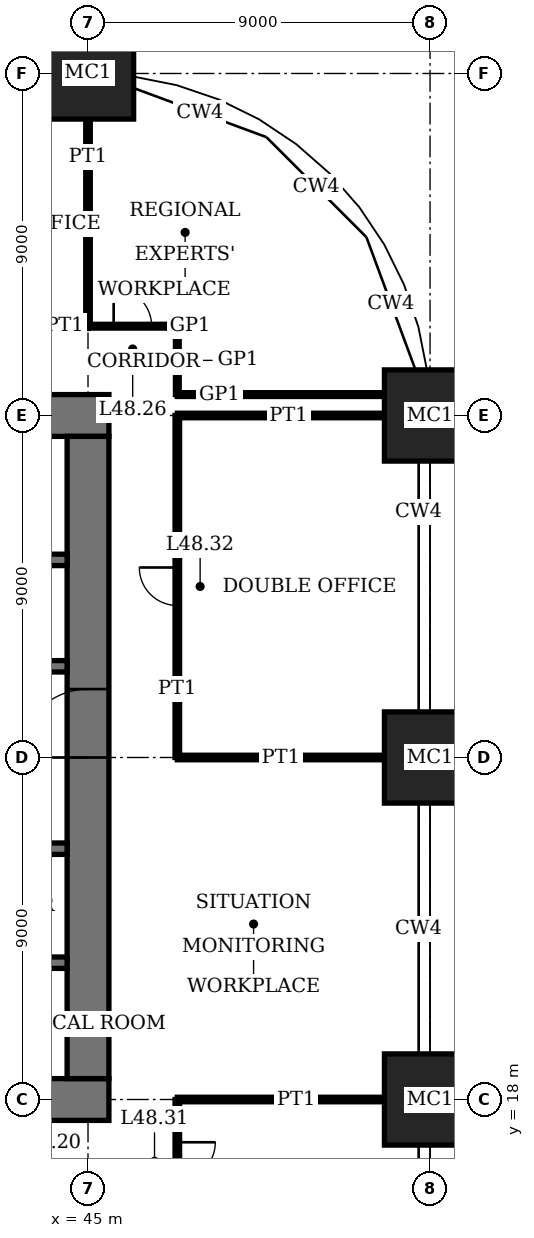
"""IFC4 building model, lengths in metres.
Left out: names, types, materials, properties, quantities, classifications, styles, units other than length and angle.
Written with IfcOpenShell. Run it as: python <this file> out.ifc"""

import sys

from ifc_helpers import new_model, si_unit, direction, frame, frame_2d, origin, origin_2d, place, context, subcontext, project, spatial, rectangle, extrude, element, fill, save


model = new_model("IFC4")
c1 = context("Model", 3, precision=1e-05, world=origin(), true_north=direction((0.0, 1.0)))
c2 = subcontext(c1, "Body", "Model", "MODEL_VIEW")
j1 = project(units=[si_unit("LENGTHUNIT", "METRE"), si_unit("PLANEANGLEUNIT", "RADIAN")], contexts=[c1])
p1 = place(None, origin())
s1 = spatial("IfcSite", under=j1, at=p1, CompositionType="ELEMENT")
p2 = place(p1, origin())
s2 = spatial("IfcBuilding", under=s1, at=p2, CompositionType="ELEMENT")
p3 = place(p2, frame((0.0, 0.0, 198.2)))
s3 = spatial("IfcBuildingStorey", under=s2, at=p3, CompositionType="ELEMENT", Elevation=198.2)
for number, where, z_axis, x_axis in (
    (1, (45.0, 45.0, 0.0), (0.0, 0.0, 1.0), (1.0, 0.0, 0.0)),
    (2, (54.0, 18.0, 0.0), (0.0, 0.0, 1.0), (1.0, 0.0, 0.0)),
    (3, (54.0, 27.0, 0.0), (0.0, 0.0, 1.0), (1.0, 0.0, 0.0)),
    (4, (54.0, 36.0, 0.0), (0.0, 0.0, 1.0), (1.0, 0.0, 0.0)),
):
    element("IfcColumn", number, at=place(p3, frame(where, z_axis=z_axis, x_axis=x_axis)), inside=s3, PredefinedType="COLUMN", context=c2, shape_type="SweptSolid", body=[
        extrude(rectangle(XDim=2.4, YDim=2.4, at=origin_2d()), origin(), (0.0, 0.0, 1.0), 4.0),
    ])
p4 = place(p3, frame((17.45, 18.0, 0.0), z_axis=(0.0, 0.0, 1.0), x_axis=(1.0, 0.0, 0.0)))
e5 = element("IfcWall", 5, at=p4, inside=s3, PredefinedType="SHEAR", context=c2, shape_type="SweptSolid", body=[
    extrude(rectangle(XDim=28.1, YDim=1.1, at=frame_2d((14.05, 0.0))), origin(), (0.0, 0.0, 1.0), 4.0),
])
p5 = place(p4, frame((11.55, 0.0, 0.0)))
e6 = element("IfcOpeningElement", 6, at=p5, cuts=e5, PredefinedType="OPENING", context=c2, shape_type="SweptSolid", body=[
    extrude(rectangle(XDim=1.0, YDim=2.4, at=frame_2d((0.5, 1.2))), frame((0.0, 0.56, 0.0), z_axis=(0.0, -1.0, 0.0), x_axis=(1.0, 0.0, 0.0)), (0.0, 0.0, 1.0), 1.12),
])
p6 = place(p4, frame((16.55, 0.0, 0.0)))
e7 = element("IfcOpeningElement", 7, at=p6, cuts=e5, PredefinedType="OPENING", context=c2, shape_type="SweptSolid", body=[
    extrude(rectangle(XDim=1.0, YDim=2.4, at=frame_2d((0.5, 1.2))), frame((0.0, 0.56, 0.0), z_axis=(0.0, -1.0, 0.0), x_axis=(1.0, 0.0, 0.0)), (0.0, 0.0, 1.0), 1.12),
])
p7 = place(p4, frame((20.0, 0.0, 0.0)))
e8 = element("IfcOpeningElement", 8, at=p7, cuts=e5, PredefinedType="OPENING", context=c2, shape_type="SweptSolid", body=[
    extrude(rectangle(XDim=1.1, YDim=2.4, at=frame_2d((0.55, 1.2))), frame((0.0, 0.56, 0.0), z_axis=(0.0, -1.0, 0.0), x_axis=(1.0, 0.0, 0.0)), (0.0, 0.0, 1.0), 1.12),
])
p8 = place(p4, frame((24.05, 0.0, 0.0)))
e9 = element("IfcOpeningElement", 9, at=p8, cuts=e5, PredefinedType="OPENING", context=c2, shape_type="SweptSolid", body=[
    extrude(rectangle(XDim=1.0, YDim=2.4, at=frame_2d((0.5, 1.2))), frame((0.0, 0.56, 0.0), z_axis=(0.0, -1.0, 0.0), x_axis=(1.0, 0.0, 0.0)), (0.0, 0.0, 1.0), 1.12),
])
p9 = place(p3, frame((45.55, 36.0, 0.0), z_axis=(0.0, 0.0, 1.0), x_axis=(-1.0, 0.0, 0.0)))
e10 = element("IfcWall", 10, at=p9, inside=s3, PredefinedType="SHEAR", context=c2, shape_type="SweptSolid", body=[
    extrude(rectangle(XDim=28.1, YDim=1.1, at=frame_2d((14.05, 0.0))), origin(), (0.0, 0.0, 1.0), 4.0),
])
p10 = place(p9, frame((11.55, 0.0, 0.0)))
e11 = element("IfcOpeningElement", 11, at=p10, cuts=e10, PredefinedType="OPENING", context=c2, shape_type="SweptSolid", body=[
    extrude(rectangle(XDim=1.0, YDim=2.4, at=frame_2d((0.5, 1.2))), frame((0.0, 0.56, 0.0), z_axis=(0.0, -1.0, 0.0), x_axis=(1.0, 0.0, 0.0)), (0.0, 0.0, 1.0), 1.12),
])
p11 = place(p9, frame((16.55, 0.0, 0.0)))
e12 = element("IfcOpeningElement", 12, at=p11, cuts=e10, PredefinedType="OPENING", context=c2, shape_type="SweptSolid", body=[
    extrude(rectangle(XDim=1.0, YDim=2.4, at=frame_2d((0.5, 1.2))), frame((0.0, 0.56, 0.0), z_axis=(0.0, -1.0, 0.0), x_axis=(1.0, 0.0, 0.0)), (0.0, 0.0, 1.0), 1.12),
])
p12 = place(p9, frame((20.0, 0.0, 0.0)))
e13 = element("IfcOpeningElement", 13, at=p12, cuts=e10, PredefinedType="OPENING", context=c2, shape_type="SweptSolid", body=[
    extrude(rectangle(XDim=1.1, YDim=2.4, at=frame_2d((0.55, 1.2))), frame((0.0, 0.56, 0.0), z_axis=(0.0, -1.0, 0.0), x_axis=(1.0, 0.0, 0.0)), (0.0, 0.0, 1.0), 1.12),
])
p13 = place(p9, frame((24.05, 0.0, 0.0)))
e14 = element("IfcOpeningElement", 14, at=p13, cuts=e10, PredefinedType="OPENING", context=c2, shape_type="SweptSolid", body=[
    extrude(rectangle(XDim=1.0, YDim=2.4, at=frame_2d((0.5, 1.2))), frame((0.0, 0.56, 0.0), z_axis=(0.0, -1.0, 0.0), x_axis=(1.0, 0.0, 0.0)), (0.0, 0.0, 1.0), 1.12),
])
p14 = place(p3, frame((45.0, 18.55, 0.0), z_axis=(0.0, 0.0, 1.0), x_axis=(0.0, 1.0, 0.0)))
e15 = element("IfcWall", 15, at=p14, inside=s3, PredefinedType="SHEAR", context=c2, shape_type="SweptSolid", body=[
    extrude(rectangle(XDim=16.9, YDim=1.1, at=frame_2d((8.45, 0.0))), origin(), (0.0, 0.0, 1.0), 4.0),
])
p15 = place(p14, frame((8.45, 0.0, 0.0)))
e16 = element("IfcOpeningElement", 16, at=p15, cuts=e15, PredefinedType="OPENING", context=c2, shape_type="SweptSolid", body=[
    extrude(rectangle(XDim=1.8, YDim=2.4, at=frame_2d((0.9, 1.2))), frame((0.0, 0.56, 0.0), z_axis=(0.0, -1.0, 0.0), x_axis=(1.0, 0.0, 0.0)), (0.0, 0.0, 1.0), 1.12),
])
p16 = place(p3, frame((36.15, 32.2, 0.0), z_axis=(0.0, 0.0, 1.0), x_axis=(1.0, 0.0, 0.0)))
e17 = element("IfcWall", 17, at=p16, inside=s3, PredefinedType="SHEAR", context=c2, shape_type="SweptSolid", body=[
    extrude(rectangle(XDim=8.3, YDim=0.3, at=frame_2d((4.15, 0.0))), origin(), (0.0, 0.0, 1.0), 4.0),
])
p17 = place(p16, frame((0.45, 0.0, 0.0)))
e18 = element("IfcOpeningElement", 18, at=p17, cuts=e17, PredefinedType="OPENING", context=c2, shape_type="SweptSolid", body=[
    extrude(rectangle(XDim=1.0, YDim=2.4, at=frame_2d((0.5, 1.2))), frame((0.0, 0.16, 0.0), z_axis=(0.0, -1.0, 0.0), x_axis=(1.0, 0.0, 0.0)), (0.0, 0.0, 1.0), 0.32),
])
p18 = place(p3, frame((18.55, 24.6, 0.0), z_axis=(0.0, 0.0, 1.0), x_axis=(1.0, 0.0, 0.0)))
e19 = element("IfcWall", 19, at=p18, inside=s3, PredefinedType="SHEAR", context=c2, shape_type="SweptSolid", body=[
    extrude(rectangle(XDim=25.9, YDim=0.3, at=frame_2d((12.95, 0.0))), origin(), (0.0, 0.0, 1.0), 4.0),
])
p19 = place(p18, frame((4.95, 0.0, 0.0)))
e20 = element("IfcOpeningElement", 20, at=p19, cuts=e19, PredefinedType="OPENING", context=c2, shape_type="SweptSolid", body=[
    extrude(rectangle(XDim=1.0, YDim=2.4, at=frame_2d((0.5, 1.2))), frame((0.0, 0.16, 0.0), z_axis=(0.0, -1.0, 0.0), x_axis=(1.0, 0.0, 0.0)), (0.0, 0.0, 1.0), 0.32),
])
p20 = place(p18, frame((24.5, 0.0, 0.0)))
e21 = element("IfcOpeningElement", 21, at=p20, cuts=e19, PredefinedType="OPENING", context=c2, shape_type="SweptSolid", body=[
    extrude(rectangle(XDim=0.9, YDim=2.1, at=frame_2d((0.45, 1.05))), frame((0.0, 0.16, 0.0), z_axis=(0.0, -1.0, 0.0), x_axis=(1.0, 0.0, 0.0)), (0.0, 0.0, 1.0), 0.32),
])
p21 = place(p18, frame((21.3, 0.0, 0.0)))
e22 = element("IfcOpeningElement", 22, at=p21, cuts=e19, PredefinedType="OPENING", context=c2, shape_type="SweptSolid", body=[
    extrude(rectangle(XDim=1.3, YDim=2.4, at=frame_2d((0.65, 1.2))), frame((0.0, 0.16, 0.0), z_axis=(0.0, -1.0, 0.0), x_axis=(1.0, 0.0, 0.0)), (0.0, 0.0, 1.0), 0.32),
])
p22 = place(p3, frame((18.55, 29.4, 0.0), z_axis=(0.0, 0.0, 1.0), x_axis=(1.0, 0.0, 0.0)))
e23 = element("IfcWall", 23, at=p22, inside=s3, PredefinedType="SHEAR", context=c2, shape_type="SweptSolid", body=[
    extrude(rectangle(XDim=25.9, YDim=0.3, at=frame_2d((12.95, 0.0))), origin(), (0.0, 0.0, 1.0), 4.0),
])
p23 = place(p22, frame((19.95, 0.0, 0.0)))
e24 = element("IfcOpeningElement", 24, at=p23, cuts=e23, PredefinedType="OPENING", context=c2, shape_type="SweptSolid", body=[
    extrude(rectangle(XDim=1.0, YDim=2.4, at=frame_2d((0.5, 1.2))), frame((0.0, 0.16, 0.0), z_axis=(0.0, -1.0, 0.0), x_axis=(1.0, 0.0, 0.0)), (0.0, 0.0, 1.0), 0.32),
])
p24 = place(p22, frame((0.5, 0.0, 0.0)))
e25 = element("IfcOpeningElement", 25, at=p24, cuts=e23, PredefinedType="OPENING", context=c2, shape_type="SweptSolid", body=[
    extrude(rectangle(XDim=0.9, YDim=2.1, at=frame_2d((0.45, 1.05))), frame((0.0, 0.16, 0.0), z_axis=(0.0, -1.0, 0.0), x_axis=(1.0, 0.0, 0.0)), (0.0, 0.0, 1.0), 0.32),
])
p25 = place(p22, frame((15.45, 0.0, 0.0)))
e26 = element("IfcOpeningElement", 26, at=p25, cuts=e23, PredefinedType="OPENING", context=c2, shape_type="SweptSolid", body=[
    extrude(rectangle(XDim=1.0, YDim=2.4, at=frame_2d((0.5, 1.2))), frame((0.0, 0.16, 0.0), z_axis=(0.0, -1.0, 0.0), x_axis=(1.0, 0.0, 0.0)), (0.0, 0.0, 1.0), 0.32),
])
p26 = place(p22, frame((12.45, 0.0, 0.0)))
e27 = element("IfcOpeningElement", 27, at=p26, cuts=e23, PredefinedType="OPENING", context=c2, shape_type="SweptSolid", body=[
    extrude(rectangle(XDim=1.0, YDim=2.4, at=frame_2d((0.5, 1.2))), frame((0.0, 0.16, 0.0), z_axis=(0.0, -1.0, 0.0), x_axis=(1.0, 0.0, 0.0)), (0.0, 0.0, 1.0), 0.32),
])
p27 = place(p22, frame((9.4, 0.0, 0.0)))
e28 = element("IfcOpeningElement", 28, at=p27, cuts=e23, PredefinedType="OPENING", context=c2, shape_type="SweptSolid", body=[
    extrude(rectangle(XDim=1.1, YDim=2.4, at=frame_2d((0.55, 1.2))), frame((0.0, 0.16, 0.0), z_axis=(0.0, -1.0, 0.0), x_axis=(1.0, 0.0, 0.0)), (0.0, 0.0, 1.0), 0.32),
])
p28 = place(p22, frame((6.4, 0.0, 0.0)))
e29 = element("IfcOpeningElement", 29, at=p28, cuts=e23, PredefinedType="OPENING", context=c2, shape_type="SweptSolid", body=[
    extrude(rectangle(XDim=1.1, YDim=2.4, at=frame_2d((0.55, 1.2))), frame((0.0, 0.16, 0.0), z_axis=(0.0, -1.0, 0.0), x_axis=(1.0, 0.0, 0.0)), (0.0, 0.0, 1.0), 0.32),
])
p29 = place(p22, frame((3.3, 0.0, 0.0)))
e30 = element("IfcOpeningElement", 30, at=p29, cuts=e23, PredefinedType="OPENING", context=c2, shape_type="SweptSolid", body=[
    extrude(rectangle(XDim=1.3, YDim=2.4, at=frame_2d((0.65, 1.2))), frame((0.0, 0.16, 0.0), z_axis=(0.0, -1.0, 0.0), x_axis=(1.0, 0.0, 0.0)), (0.0, 0.0, 1.0), 0.32),
])
p30 = place(p3, frame((27.15, 21.6, 0.0), z_axis=(0.0, 0.0, 1.0), x_axis=(1.0, 0.0, 0.0)))
e31 = element("IfcWall", 31, at=p30, inside=s3, PredefinedType="SHEAR", context=c2, shape_type="SweptSolid", body=[
    extrude(rectangle(XDim=17.3, YDim=0.3, at=frame_2d((8.65, 0.0))), origin(), (0.0, 0.0, 1.0), 4.0),
])
for number, where, z_axis, x_axis in (
    (32, (47.35, 18.0, 0.0), (0.0, 0.0, 1.0), (1.0, 0.0, 0.0)),
    (33, (47.35, 27.0, 0.0), (0.0, 0.0, 1.0), (1.0, 0.0, 0.0)),
    (34, (47.35, 36.0, 0.0), (0.0, 0.0, 1.0), (1.0, 0.0, 0.0)),
):
    element("IfcWall", number, at=place(p3, frame(where, z_axis=z_axis, x_axis=x_axis)), inside=s3, PredefinedType="PARTITIONING", context=c2, shape_type="SweptSolid", body=[
        extrude(rectangle(XDim=5.45, YDim=0.12, at=frame_2d((2.725, 0.0))), origin(), (0.0, 0.0, 1.0), 3.05),
    ])
p31 = place(p3, frame((47.35, 36.55, 0.0), z_axis=(0.0, 0.0, 1.0), x_axis=(1.0, 0.0, 0.0)))
e35 = element("IfcWall", 35, at=p31, inside=s3, PredefinedType="PARTITIONING", context=c2, shape_type="SweptSolid", body=[
    extrude(rectangle(XDim=5.45, YDim=0.1, at=frame_2d((2.725, 0.0))), origin(), (0.0, 0.0, 1.0), 3.75),
])
p32 = place(p3, frame((40.5, 38.35, 0.0), z_axis=(0.0, 0.0, 1.0), x_axis=(1.0, 0.0, 0.0)))
e36 = element("IfcWall", 36, at=p32, inside=s3, PredefinedType="PARTITIONING", context=c2, shape_type="SweptSolid", body=[
    extrude(rectangle(XDim=4.5, YDim=0.12, at=frame_2d((2.25, 0.0))), origin(), (0.0, 0.0, 1.0), 3.75),
])
p33 = place(p32, frame((1.75, 0.0, 0.0)))
e37 = element("IfcOpeningElement", 37, at=p33, cuts=e36, PredefinedType="OPENING", context=c2, shape_type="SweptSolid", body=[
    extrude(rectangle(XDim=1.0, YDim=2.4, at=frame_2d((0.5, 1.2))), frame((0.0, 0.07, 0.0), z_axis=(0.0, -1.0, 0.0), x_axis=(1.0, 0.0, 0.0)), (0.0, 0.0, 1.0), 0.14),
])
p34 = place(p3, frame((45.0, 38.35, 0.0), z_axis=(0.0, 0.0, 1.0), x_axis=(1.0, 0.0, 0.0)))
e38 = element("IfcWall", 38, at=p34, inside=s3, PredefinedType="PARTITIONING", context=c2, shape_type="SweptSolid", body=[
    extrude(rectangle(XDim=2.35, YDim=0.1, at=frame_2d((1.175, 0.0))), origin(), (0.0, 0.0, 1.0), 3.75),
])
p35 = place(p34, frame((0.675, 0.0, 0.0)))
e39 = element("IfcOpeningElement", 39, at=p35, cuts=e38, PredefinedType="OPENING", context=c2, shape_type="SweptSolid", body=[
    extrude(rectangle(XDim=1.0, YDim=2.4, at=frame_2d((0.5, 1.2))), frame((0.0, 0.06, 0.0), z_axis=(0.0, -1.0, 0.0), x_axis=(1.0, 0.0, 0.0)), (0.0, 0.0, 1.0), 0.12),
])
p36 = place(p3, frame((45.0, 38.35, 0.0), z_axis=(0.0, 0.0, 1.0), x_axis=(0.0, 1.0, 0.0)))
e40 = element("IfcWall", 40, at=p36, inside=s3, PredefinedType="PARTITIONING", context=c2, shape_type="SweptSolid", body=[
    extrude(rectangle(XDim=5.45, YDim=0.12, at=frame_2d((2.725, 0.0))), origin(), (0.0, 0.0, 1.0), 3.05),
])
p37 = place(p3, frame((47.35, 13.25, 0.0), z_axis=(0.0, 0.0, 1.0), x_axis=(0.0, 1.0, 0.0)))
e41 = element("IfcWall", 41, at=p37, inside=s3, PredefinedType="PARTITIONING", context=c2, shape_type="SweptSolid", body=[
    extrude(rectangle(XDim=4.75, YDim=0.12, at=frame_2d((2.375, 0.0))), origin(), (0.0, 0.0, 1.0), 3.75),
])
p38 = place(p37, frame((2.625, 0.0, 0.0)))
e42 = element("IfcOpeningElement", 42, at=p38, cuts=e41, PredefinedType="OPENING", context=c2, shape_type="SweptSolid", body=[
    extrude(rectangle(XDim=1.0, YDim=2.4, at=frame_2d((0.5, 1.2))), frame((0.0, 0.07, 0.0), z_axis=(0.0, -1.0, 0.0), x_axis=(1.0, 0.0, 0.0)), (0.0, 0.0, 1.0), 0.14),
])
p39 = place(p3, frame((47.35, 27.0, 0.0), z_axis=(0.0, 0.0, 1.0), x_axis=(0.0, 1.0, 0.0)))
e43 = element("IfcWall", 43, at=p39, inside=s3, PredefinedType="PARTITIONING", context=c2, shape_type="SweptSolid", body=[
    extrude(rectangle(XDim=9.0, YDim=0.12, at=frame_2d((4.5, 0.0))), origin(), (0.0, 0.0, 1.0), 3.75),
])
p40 = place(p39, frame((4.0, 0.0, 0.0)))
e44 = element("IfcOpeningElement", 44, at=p40, cuts=e43, PredefinedType="OPENING", context=c2, shape_type="SweptSolid", body=[
    extrude(rectangle(XDim=1.0, YDim=2.4, at=frame_2d((0.5, 1.2))), frame((0.0, 0.07, 0.0), z_axis=(0.0, -1.0, 0.0), x_axis=(1.0, 0.0, 0.0)), (0.0, 0.0, 1.0), 0.14),
])
p41 = place(p3, frame((47.35, 36.55, 0.0), z_axis=(0.0, 0.0, 1.0), x_axis=(0.0, 1.0, 0.0)))
e45 = element("IfcWall", 45, at=p41, inside=s3, PredefinedType="PARTITIONING", context=c2, shape_type="SweptSolid", body=[
    extrude(rectangle(XDim=1.8, YDim=0.1, at=frame_2d((0.9, 0.0))), origin(), (0.0, 0.0, 1.0), 3.75),
])
p42 = place(p15, origin())
e46 = element("IfcDoor", 46, at=p42, inside=s3, OperationType="DOUBLE_DOOR_DOUBLE_SWING", PredefinedType="DOOR", context=c2, shape_type="SweptSolid", body=[
    extrude(rectangle(XDim=1.8, YDim=2.4, at=frame_2d((0.9, 1.2))), frame((0.0, 0.03, 0.0), z_axis=(0.0, -1.0, 0.0), x_axis=(1.0, 0.0, 0.0)), (0.0, 0.0, 1.0), 0.06),
    extrude(rectangle(XDim=0.04, YDim=2.4, at=frame_2d((0.02, 1.2))), frame((0.0, 0.55, 0.0), z_axis=(0.0, -1.0, 0.0), x_axis=(1.0, 0.0, 0.0)), (0.0, 0.0, 1.0), 1.1),
    extrude(rectangle(XDim=0.04, YDim=2.4, at=frame_2d((1.78, 1.2))), frame((0.0, 0.55, 0.0), z_axis=(0.0, -1.0, 0.0), x_axis=(1.0, 0.0, 0.0)), (0.0, 0.0, 1.0), 1.1),
    extrude(rectangle(XDim=1.8, YDim=0.04, at=frame_2d((0.9, 2.38))), frame((0.0, 0.55, 0.0), z_axis=(0.0, -1.0, 0.0), x_axis=(1.0, 0.0, 0.0)), (0.0, 0.0, 1.0), 1.1),
])
fill(e16, e46)
p43 = place(p35, origin())
e47 = element("IfcDoor", 47, at=p43, inside=s3, OperationType="SINGLE_SWING_RIGHT", PredefinedType="DOOR", context=c2, shape_type="SweptSolid", body=[
    extrude(rectangle(XDim=1.0, YDim=2.4, at=frame_2d((0.5, 1.2))), frame((0.0, 0.02, 0.0), z_axis=(0.0, -1.0, 0.0), x_axis=(1.0, 0.0, 0.0)), (0.0, 0.0, 1.0), 0.04),
])
fill(e39, e47)
p44 = place(p38, origin())
e48 = element("IfcDoor", 48, at=p44, inside=s3, OperationType="SINGLE_SWING_RIGHT", PredefinedType="DOOR", context=c2, shape_type="SweptSolid", body=[
    extrude(rectangle(XDim=1.0, YDim=2.4, at=frame_2d((0.5, 1.2))), frame((0.0, 0.025, 0.0), z_axis=(0.0, -1.0, 0.0), x_axis=(1.0, 0.0, 0.0)), (0.0, 0.0, 1.0), 0.05),
])
fill(e42, e48)
p45 = place(p40, origin())
e49 = element("IfcDoor", 49, at=p45, inside=s3, OperationType="SINGLE_SWING_LEFT", PredefinedType="DOOR", context=c2, shape_type="SweptSolid", body=[
    extrude(rectangle(XDim=1.0, YDim=2.4, at=frame_2d((0.5, 1.2))), frame((0.0, 0.025, 0.0), z_axis=(0.0, -1.0, 0.0), x_axis=(1.0, 0.0, 0.0)), (0.0, 0.0, 1.0), 0.05),
])
fill(e44, e49)
save(model, sys.argv[1])
